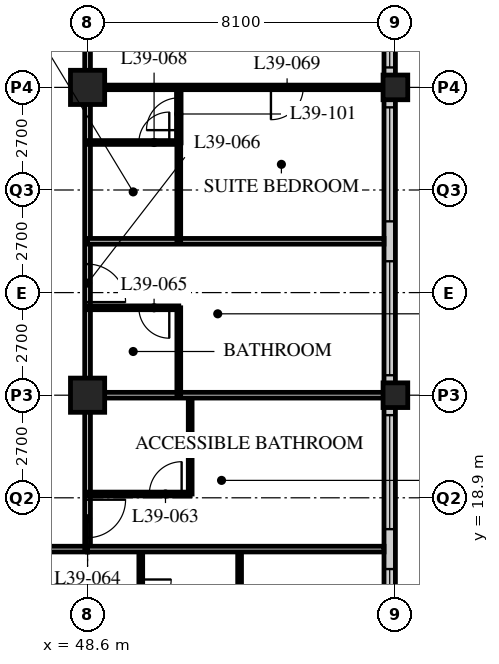
"""IFC4 building model, lengths in metres.
Left out: names, types, materials, properties, quantities, classifications, styles, units other than length and angle.
Written with IfcOpenShell. Run it as: python <this file> out.ifc"""

import sys

from ifc_helpers import new_model, si_unit, direction, frame, frame_2d, origin, origin_2d, place, context, subcontext, project, spatial, rectangle, hollow_rectangle, extrude, element, fill, save


model = new_model("IFC4")
c1 = context("Model", 3, precision=1e-05, world=origin(), true_north=direction((0.0, 1.0)))
c2 = subcontext(c1, "Body", "Model", "MODEL_VIEW")
j1 = project(units=[si_unit("LENGTHUNIT", "METRE"), si_unit("PLANEANGLEUNIT", "RADIAN")], contexts=[c1])
p1 = place(None, origin())
s1 = spatial("IfcSite", under=j1, at=p1, CompositionType="ELEMENT")
p2 = place(p1, origin())
s2 = spatial("IfcBuilding", under=s1, at=p2, CompositionType="ELEMENT")
p3 = place(p2, frame((0.0, 0.0, 151.0)))
s3 = spatial("IfcBuildingStorey", under=s2, at=p3, CompositionType="ELEMENT", Elevation=151.0)
for number, where, z_axis, x_axis in (
    (1, (48.6, 21.6, 0.0), (0.0, 0.0, 1.0), (1.0, 0.0, 0.0)),
    (2, (48.6, 29.7, 0.0), (0.0, 0.0, 1.0), (1.0, 0.0, 0.0)),
):
    element("IfcColumn", number, at=place(p3, frame(where, z_axis=z_axis, x_axis=x_axis)), inside=s3, PredefinedType="COLUMN", context=c2, shape_type="SweptSolid", body=[
        extrude(hollow_rectangle(XDim=0.9, YDim=0.9, WallThickness=0.1, at=origin_2d()), origin(), (0.0, 0.0, 1.0), 3.4),
    ])
for number, where, z_axis, x_axis in (
    (3, (56.7, 21.6, 0.0), (0.0, 0.0, 1.0), (1.0, 0.0, 0.0)),
    (4, (56.7, 29.7, 0.0), (0.0, 0.0, 1.0), (1.0, 0.0, 0.0)),
):
    element("IfcColumn", number, at=place(p3, frame(where, z_axis=z_axis, x_axis=x_axis)), inside=s3, PredefinedType="COLUMN", context=c2, shape_type="SweptSolid", body=[
        extrude(hollow_rectangle(XDim=0.65, YDim=0.65, WallThickness=0.055, at=origin_2d()), origin(), (0.0, 0.0, 1.0), 3.4),
    ])
p4 = place(p3, frame((56.55, 13.8, 0.0), z_axis=(0.0, 0.0, 1.0), x_axis=(0.0, 1.0, 0.0)))
e5 = element("IfcWall", 5, at=p4, inside=s3, PredefinedType="SOLIDWALL", context=c2, shape_type="SweptSolid", body=[
    extrude(rectangle(XDim=32.1, YDim=0.3, at=frame_2d((16.05, 0.0))), origin(), (0.0, 0.0, 1.0), 3.19),
])
p5 = place(p4, frame((0.225, 0.0, 0.9)))
e6 = element("IfcOpeningElement", 6, at=p5, cuts=e5, PredefinedType="OPENING", context=c2, shape_type="SweptSolid", body=[
    extrude(rectangle(XDim=3.0, YDim=1.4, at=frame_2d((1.5, 0.7))), frame((0.0, 0.16, 0.0), z_axis=(0.0, -1.0, 0.0), x_axis=(1.0, 0.0, 0.0)), (0.0, 0.0, 1.0), 0.32),
])
p6 = place(p4, frame((4.275, 0.0, 0.9)))
e7 = element("IfcOpeningElement", 7, at=p6, cuts=e5, PredefinedType="OPENING", context=c2, shape_type="SweptSolid", body=[
    extrude(rectangle(XDim=3.0, YDim=1.4, at=frame_2d((1.5, 0.7))), frame((0.0, 0.16, 0.0), z_axis=(0.0, -1.0, 0.0), x_axis=(1.0, 0.0, 0.0)), (0.0, 0.0, 1.0), 0.32),
])
p7 = place(p4, frame((8.325, 0.0, 0.9)))
e8 = element("IfcOpeningElement", 8, at=p7, cuts=e5, PredefinedType="OPENING", context=c2, shape_type="SweptSolid", body=[
    extrude(rectangle(XDim=3.0, YDim=1.4, at=frame_2d((1.5, 0.7))), frame((0.0, 0.16, 0.0), z_axis=(0.0, -1.0, 0.0), x_axis=(1.0, 0.0, 0.0)), (0.0, 0.0, 1.0), 0.32),
])
p8 = place(p4, frame((12.375, 0.0, 0.9)))
e9 = element("IfcOpeningElement", 9, at=p8, cuts=e5, PredefinedType="OPENING", context=c2, shape_type="SweptSolid", body=[
    extrude(rectangle(XDim=3.0, YDim=1.4, at=frame_2d((1.5, 0.7))), frame((0.0, 0.16, 0.0), z_axis=(0.0, -1.0, 0.0), x_axis=(1.0, 0.0, 0.0)), (0.0, 0.0, 1.0), 0.32),
])
p9 = place(p4, frame((16.425, 0.0, 0.9)))
e10 = element("IfcOpeningElement", 10, at=p9, cuts=e5, PredefinedType="OPENING", context=c2, shape_type="SweptSolid", body=[
    extrude(rectangle(XDim=3.0, YDim=1.4, at=frame_2d((1.5, 0.7))), frame((0.0, 0.16, 0.0), z_axis=(0.0, -1.0, 0.0), x_axis=(1.0, 0.0, 0.0)), (0.0, 0.0, 1.0), 0.32),
])
p10 = place(p4, frame((20.475, 0.0, 0.9)))
e11 = element("IfcOpeningElement", 11, at=p10, cuts=e5, PredefinedType="OPENING", context=c2, shape_type="SweptSolid", body=[
    extrude(rectangle(XDim=3.0, YDim=1.4, at=frame_2d((1.5, 0.7))), frame((0.0, 0.16, 0.0), z_axis=(0.0, -1.0, 0.0), x_axis=(1.0, 0.0, 0.0)), (0.0, 0.0, 1.0), 0.32),
])
p11 = place(p4, frame((24.525, 0.0, 0.9)))
e12 = element("IfcOpeningElement", 12, at=p11, cuts=e5, PredefinedType="OPENING", context=c2, shape_type="SweptSolid", body=[
    extrude(rectangle(XDim=3.0, YDim=1.4, at=frame_2d((1.5, 0.7))), frame((0.0, 0.16, 0.0), z_axis=(0.0, -1.0, 0.0), x_axis=(1.0, 0.0, 0.0)), (0.0, 0.0, 1.0), 0.32),
])
p12 = place(p4, frame((28.575, 0.0, 0.9)))
e13 = element("IfcOpeningElement", 13, at=p12, cuts=e5, PredefinedType="OPENING", context=c2, shape_type="SweptSolid", body=[
    extrude(rectangle(XDim=3.0, YDim=1.4, at=frame_2d((1.5, 0.7))), frame((0.0, 0.16, 0.0), z_axis=(0.0, -1.0, 0.0), x_axis=(1.0, 0.0, 0.0)), (0.0, 0.0, 1.0), 0.32),
])
p13 = place(p3, frame((8.1, 17.55, 0.0), z_axis=(0.0, 0.0, 1.0), x_axis=(1.0, 0.0, 0.0)))
e14 = element("IfcWall", 14, at=p13, inside=s3, PredefinedType="PARTITIONING", context=c2, shape_type="SweptSolid", body=[
    extrude(rectangle(XDim=40.5, YDim=0.15, at=frame_2d((20.25, 0.0))), origin(), (0.0, 0.0, 1.0), 3.19),
])
p14 = place(p13, frame((10.0, 0.0, 0.0)))
e15 = element("IfcOpeningElement", 15, at=p14, cuts=e14, PredefinedType="OPENING", context=c2, shape_type="SweptSolid", body=[
    extrude(rectangle(XDim=1.0, YDim=2.1, at=frame_2d((0.5, 1.05))), frame((0.0, 0.085, 0.0), z_axis=(0.0, -1.0, 0.0), x_axis=(1.0, 0.0, 0.0)), (0.0, 0.0, 1.0), 0.17),
])
p15 = place(p13, frame((22.15, 0.0, 0.0)))
e16 = element("IfcOpeningElement", 16, at=p15, cuts=e14, PredefinedType="OPENING", context=c2, shape_type="SweptSolid", body=[
    extrude(rectangle(XDim=1.0, YDim=2.1, at=frame_2d((0.5, 1.05))), frame((0.0, 0.085, 0.0), z_axis=(0.0, -1.0, 0.0), x_axis=(1.0, 0.0, 0.0)), (0.0, 0.0, 1.0), 0.17),
])
p16 = place(p13, frame((30.8, 0.0, 0.0)))
e17 = element("IfcOpeningElement", 17, at=p16, cuts=e14, PredefinedType="OPENING", context=c2, shape_type="SweptSolid", body=[
    extrude(rectangle(XDim=1.0, YDim=2.1, at=frame_2d((0.5, 1.05))), frame((0.0, 0.085, 0.0), z_axis=(0.0, -1.0, 0.0), x_axis=(1.0, 0.0, 0.0)), (0.0, 0.0, 1.0), 0.17),
])
p17 = place(p13, frame((34.85, 0.0, 0.0)))
e18 = element("IfcOpeningElement", 18, at=p17, cuts=e14, PredefinedType="OPENING", context=c2, shape_type="SweptSolid", body=[
    extrude(rectangle(XDim=1.0, YDim=2.1, at=frame_2d((0.5, 1.05))), frame((0.0, 0.085, 0.0), z_axis=(0.0, -1.0, 0.0), x_axis=(1.0, 0.0, 0.0)), (0.0, 0.0, 1.0), 0.17),
])
p18 = place(p13, frame((1.525, 0.0, 0.0)))
e19 = element("IfcOpeningElement", 19, at=p18, cuts=e14, PredefinedType="OPENING", context=c2, shape_type="SweptSolid", body=[
    extrude(rectangle(XDim=1.0, YDim=2.1, at=frame_2d((0.5, 1.05))), frame((0.0, 0.085, 0.0), z_axis=(0.0, -1.0, 0.0), x_axis=(1.0, 0.0, 0.0)), (0.0, 0.0, 1.0), 0.17),
])
p19 = place(p13, frame((37.975, 0.0, 0.0)))
e20 = element("IfcOpeningElement", 20, at=p19, cuts=e14, PredefinedType="OPENING", context=c2, shape_type="SweptSolid", body=[
    extrude(rectangle(XDim=1.0, YDim=2.1, at=frame_2d((0.5, 1.05))), frame((0.0, 0.085, 0.0), z_axis=(0.0, -1.0, 0.0), x_axis=(1.0, 0.0, 0.0)), (0.0, 0.0, 1.0), 0.17),
])
p20 = place(p3, frame((48.6, 17.55, 0.0), z_axis=(0.0, 0.0, 1.0), x_axis=(0.0, 1.0, 0.0)))
e21 = element("IfcWall", 21, at=p20, inside=s3, PredefinedType="PARTITIONING", context=c2, shape_type="SweptSolid", body=[
    extrude(rectangle(XDim=28.35, YDim=0.15, at=frame_2d((14.175, 0.0))), origin(), (0.0, 0.0, 1.0), 2.42),
])
p21 = place(p20, frame((0.3, 0.0, 0.0)))
e22 = element("IfcOpeningElement", 22, at=p21, cuts=e21, PredefinedType="OPENING", context=c2, shape_type="SweptSolid", body=[
    extrude(rectangle(XDim=1.0, YDim=2.1, at=frame_2d((0.5, 1.05))), frame((0.0, 0.085, 0.0), z_axis=(0.0, -1.0, 0.0), x_axis=(1.0, 0.0, 0.0)), (0.0, 0.0, 1.0), 0.17),
])
p22 = place(p20, frame((6.5, 0.0, 0.0)))
e23 = element("IfcOpeningElement", 23, at=p22, cuts=e21, PredefinedType="OPENING", context=c2, shape_type="SweptSolid", body=[
    extrude(rectangle(XDim=1.0, YDim=2.1, at=frame_2d((0.5, 1.05))), frame((0.0, 0.085, 0.0), z_axis=(0.0, -1.0, 0.0), x_axis=(1.0, 0.0, 0.0)), (0.0, 0.0, 1.0), 0.17),
])
p23 = place(p20, frame((13.675, 0.0, 0.0)))
e24 = element("IfcOpeningElement", 24, at=p23, cuts=e21, PredefinedType="OPENING", context=c2, shape_type="SweptSolid", body=[
    extrude(rectangle(XDim=1.0, YDim=2.1, at=frame_2d((0.5, 1.05))), frame((0.0, 0.085, 0.0), z_axis=(0.0, -1.0, 0.0), x_axis=(1.0, 0.0, 0.0)), (0.0, 0.0, 1.0), 0.17),
])
p24 = place(p20, frame((22.7, 0.0, 0.0)))
e25 = element("IfcOpeningElement", 25, at=p24, cuts=e21, PredefinedType="OPENING", context=c2, shape_type="SweptSolid", body=[
    extrude(rectangle(XDim=1.0, YDim=2.1, at=frame_2d((0.5, 1.05))), frame((0.0, 0.085, 0.0), z_axis=(0.0, -1.0, 0.0), x_axis=(1.0, 0.0, 0.0)), (0.0, 0.0, 1.0), 0.17),
])
p25 = place(p20, frame((24.9, 0.0, 0.0)))
e26 = element("IfcOpeningElement", 26, at=p25, cuts=e21, PredefinedType="OPENING", context=c2, shape_type="SweptSolid", body=[
    extrude(rectangle(XDim=1.0, YDim=2.1, at=frame_2d((0.5, 1.05))), frame((0.0, 0.085, 0.0), z_axis=(0.0, -1.0, 0.0), x_axis=(1.0, 0.0, 0.0)), (0.0, 0.0, 1.0), 0.17),
])
p26 = place(p3, frame((51.3, 19.0, 0.0), z_axis=(0.0, 0.0, 1.0), x_axis=(0.0, 1.0, 0.0)))
e27 = element("IfcWall", 27, at=p26, inside=s3, PredefinedType="PARTITIONING", context=c2, shape_type="SweptSolid", body=[
    extrude(rectangle(XDim=2.6, YDim=0.1, at=frame_2d((1.3, 0.0))), origin(), (0.0, 0.0, 1.0), 3.19),
])
p27 = place(p3, frame((48.6, 19.0, 0.0), z_axis=(0.0, 0.0, 1.0), x_axis=(1.0, 0.0, 0.0)))
e28 = element("IfcWall", 28, at=p27, inside=s3, PredefinedType="PARTITIONING", context=c2, shape_type="SweptSolid", body=[
    extrude(rectangle(XDim=2.7, YDim=0.1, at=frame_2d((1.35, 0.0))), origin(), (0.0, 0.0, 1.0), 3.19),
])
p28 = place(p27, frame((1.625, 0.0, 0.0)))
e29 = element("IfcOpeningElement", 29, at=p28, cuts=e28, PredefinedType="OPENING", context=c2, shape_type="SweptSolid", body=[
    extrude(rectangle(XDim=0.85, YDim=2.1, at=frame_2d((0.425, 1.05))), frame((0.0, 0.06, 0.0), z_axis=(0.0, -1.0, 0.0), x_axis=(1.0, 0.0, 0.0)), (0.0, 0.0, 1.0), 0.12),
])
p29 = place(p3, frame((48.6, 21.6, 0.0), z_axis=(0.0, 0.0, 1.0), x_axis=(1.0, 0.0, 0.0)))
e30 = element("IfcWall", 30, at=p29, inside=s3, PredefinedType="PARTITIONING", context=c2, shape_type="SweptSolid", body=[
    extrude(rectangle(XDim=7.8, YDim=0.15, at=frame_2d((3.9, 0.0))), origin(), (0.0, 0.0, 1.0), 2.42),
])
p30 = place(p3, frame((51.0, 21.6, 0.0), z_axis=(0.0, 0.0, 1.0), x_axis=(0.0, 1.0, 0.0)))
e31 = element("IfcWall", 31, at=p30, inside=s3, PredefinedType="PARTITIONING", context=c2, shape_type="SweptSolid", body=[
    extrude(rectangle(XDim=2.3, YDim=0.1, at=frame_2d((1.15, 0.0))), origin(), (0.0, 0.0, 1.0), 3.19),
])
p31 = place(p3, frame((48.6, 23.9, 0.0), z_axis=(0.0, 0.0, 1.0), x_axis=(1.0, 0.0, 0.0)))
e32 = element("IfcWall", 32, at=p31, inside=s3, PredefinedType="PARTITIONING", context=c2, shape_type="SweptSolid", body=[
    extrude(rectangle(XDim=2.4, YDim=0.1, at=frame_2d((1.2, 0.0))), origin(), (0.0, 0.0, 1.0), 3.19),
])
p32 = place(p31, frame((1.35, 0.0, 0.0)))
e33 = element("IfcOpeningElement", 33, at=p32, cuts=e32, PredefinedType="OPENING", context=c2, shape_type="SweptSolid", body=[
    extrude(rectangle(XDim=0.8, YDim=2.1, at=frame_2d((0.4, 1.05))), frame((0.0, 0.06, 0.0), z_axis=(0.0, -1.0, 0.0), x_axis=(1.0, 0.0, 0.0)), (0.0, 0.0, 1.0), 0.12),
])
p33 = place(p3, frame((48.6, 25.65, 0.0), z_axis=(0.0, 0.0, 1.0), x_axis=(1.0, 0.0, 0.0)))
e34 = element("IfcWall", 34, at=p33, inside=s3, PredefinedType="PARTITIONING", context=c2, shape_type="SweptSolid", body=[
    extrude(rectangle(XDim=7.8, YDim=0.15, at=frame_2d((3.9, 0.0))), origin(), (0.0, 0.0, 1.0), 3.19),
])
p34 = place(p3, frame((51.0, 25.65, 0.0), z_axis=(0.0, 0.0, 1.0), x_axis=(0.0, 1.0, 0.0)))
e35 = element("IfcWall", 35, at=p34, inside=s3, PredefinedType="PARTITIONING", context=c2, shape_type="SweptSolid", body=[
    extrude(rectangle(XDim=2.6, YDim=0.1, at=frame_2d((1.3, 0.0))), origin(), (0.0, 0.0, 1.0), 3.19),
])
p35 = place(p3, frame((48.6, 28.25, 0.0), z_axis=(0.0, 0.0, 1.0), x_axis=(1.0, 0.0, 0.0)))
e36 = element("IfcWall", 36, at=p35, inside=s3, PredefinedType="PARTITIONING", context=c2, shape_type="SweptSolid", body=[
    extrude(rectangle(XDim=2.4, YDim=0.1, at=frame_2d((1.2, 0.0))), origin(), (0.0, 0.0, 1.0), 3.19),
])
p36 = place(p35, frame((1.35, 0.0, 0.0)))
e37 = element("IfcOpeningElement", 37, at=p36, cuts=e36, PredefinedType="OPENING", context=c2, shape_type="SweptSolid", body=[
    extrude(rectangle(XDim=0.8, YDim=2.1, at=frame_2d((0.4, 1.05))), frame((0.0, 0.06, 0.0), z_axis=(0.0, -1.0, 0.0), x_axis=(1.0, 0.0, 0.0)), (0.0, 0.0, 1.0), 0.12),
])
p37 = place(p3, frame((48.6, 29.7, 0.0), z_axis=(0.0, 0.0, 1.0), x_axis=(1.0, 0.0, 0.0)))
e38 = element("IfcWall", 38, at=p37, inside=s3, PredefinedType="PARTITIONING", context=c2, shape_type="SweptSolid", body=[
    extrude(rectangle(XDim=7.8, YDim=0.12, at=frame_2d((3.9, 0.0))), origin(), (0.0, 0.0, 1.0), 2.42),
])
p38 = place(p37, frame((4.825, 0.0, 0.0)))
e39 = element("IfcOpeningElement", 39, at=p38, cuts=e38, PredefinedType="OPENING", context=c2, shape_type="SweptSolid", body=[
    extrude(rectangle(XDim=0.85, YDim=2.1, at=frame_2d((0.425, 1.05))), frame((0.0, 0.07, 0.0), z_axis=(0.0, -1.0, 0.0), x_axis=(1.0, 0.0, 0.0)), (0.0, 0.0, 1.0), 0.14),
])
p39 = place(p3, frame((50.0, 17.55, 0.0), z_axis=(0.0, 0.0, 1.0), x_axis=(0.0, -1.0, 0.0)))
e40 = element("IfcWall", 40, at=p39, inside=s3, PredefinedType="PARTITIONING", context=c2, shape_type="SweptSolid", body=[
    extrude(rectangle(XDim=2.4, YDim=0.1, at=frame_2d((1.2, 0.0))), origin(), (0.0, 0.0, 1.0), 3.19),
])
p40 = place(p39, frame((0.8, 0.0, 0.0)))
e41 = element("IfcOpeningElement", 41, at=p40, cuts=e40, PredefinedType="OPENING", context=c2, shape_type="SweptSolid", body=[
    extrude(rectangle(XDim=0.8, YDim=2.1, at=frame_2d((0.4, 1.05))), frame((0.0, 0.06, 0.0), z_axis=(0.0, -1.0, 0.0), x_axis=(1.0, 0.0, 0.0)), (0.0, 0.0, 1.0), 0.12),
])
p41 = place(p3, frame((52.6, 17.55, 0.0), z_axis=(0.0, 0.0, 1.0), x_axis=(0.0, -1.0, 0.0)))
e42 = element("IfcWall", 42, at=p41, inside=s3, PredefinedType="PARTITIONING", context=c2, shape_type="SweptSolid", body=[
    extrude(rectangle(XDim=2.4, YDim=0.1, at=frame_2d((1.2, 0.0))), origin(), (0.0, 0.0, 1.0), 3.19),
])
p42 = place(p3, frame((48.6, 17.55, 0.0), z_axis=(0.0, 0.0, 1.0), x_axis=(1.0, 0.0, 0.0)))
e43 = element("IfcWall", 43, at=p42, inside=s3, PredefinedType="PARTITIONING", context=c2, shape_type="SweptSolid", body=[
    extrude(rectangle(XDim=7.8, YDim=0.15, at=frame_2d((3.9, 0.0))), origin(), (0.0, 0.0, 1.0), 3.19),
])
p43 = place(p3, frame((51.0, 29.7, 0.0), z_axis=(0.0, 0.0, 1.0), x_axis=(0.0, -1.0, 0.0)))
e44 = element("IfcWall", 44, at=p43, inside=s3, PredefinedType="PARTITIONING", context=c2, shape_type="SweptSolid", body=[
    extrude(rectangle(XDim=1.46, YDim=0.12, at=frame_2d((0.73, 0.0))), origin(), (0.0, 0.0, 1.0), 3.19),
])
p44 = place(p43, frame((0.275, 0.0, 0.0)))
e45 = element("IfcOpeningElement", 45, at=p44, cuts=e44, PredefinedType="OPENING", context=c2, shape_type="SweptSolid", body=[
    extrude(rectangle(XDim=0.85, YDim=2.1, at=frame_2d((0.425, 1.05))), frame((0.0, 0.07, 0.0), z_axis=(0.0, -1.0, 0.0), x_axis=(1.0, 0.0, 0.0)), (0.0, 0.0, 1.0), 0.14),
])
p45 = place(p5, origin())
e46 = element("IfcWindow", 46, at=p45, inside=s3, PartitioningType="SINGLE_PANEL", PredefinedType="WINDOW", context=c2, shape_type="SweptSolid", body=[
    extrude(rectangle(XDim=3.0, YDim=1.4, at=frame_2d((1.5, 0.7))), frame((0.0, 0.03, 0.0), z_axis=(0.0, -1.0, 0.0), x_axis=(1.0, 0.0, 0.0)), (0.0, 0.0, 1.0), 0.06),
])
fill(e6, e46)
p46 = place(p6, origin())
e47 = element("IfcWindow", 47, at=p46, inside=s3, PartitioningType="SINGLE_PANEL", PredefinedType="WINDOW", context=c2, shape_type="SweptSolid", body=[
    extrude(rectangle(XDim=3.0, YDim=1.4, at=frame_2d((1.5, 0.7))), frame((0.0, 0.03, 0.0), z_axis=(0.0, -1.0, 0.0), x_axis=(1.0, 0.0, 0.0)), (0.0, 0.0, 1.0), 0.06),
])
fill(e7, e47)
p47 = place(p7, origin())
e48 = element("IfcWindow", 48, at=p47, inside=s3, PartitioningType="SINGLE_PANEL", PredefinedType="WINDOW", context=c2, shape_type="SweptSolid", body=[
    extrude(rectangle(XDim=3.0, YDim=1.4, at=frame_2d((1.5, 0.7))), frame((0.0, 0.03, 0.0), z_axis=(0.0, -1.0, 0.0), x_axis=(1.0, 0.0, 0.0)), (0.0, 0.0, 1.0), 0.06),
])
fill(e8, e48)
p48 = place(p8, origin())
e49 = element("IfcWindow", 49, at=p48, inside=s3, PartitioningType="SINGLE_PANEL", PredefinedType="WINDOW", context=c2, shape_type="SweptSolid", body=[
    extrude(rectangle(XDim=3.0, YDim=1.4, at=frame_2d((1.5, 0.7))), frame((0.0, 0.03, 0.0), z_axis=(0.0, -1.0, 0.0), x_axis=(1.0, 0.0, 0.0)), (0.0, 0.0, 1.0), 0.06),
])
fill(e9, e49)
p49 = place(p9, origin())
e50 = element("IfcWindow", 50, at=p49, inside=s3, PartitioningType="SINGLE_PANEL", PredefinedType="WINDOW", context=c2, shape_type="SweptSolid", body=[
    extrude(rectangle(XDim=3.0, YDim=1.4, at=frame_2d((1.5, 0.7))), frame((0.0, 0.03, 0.0), z_axis=(0.0, -1.0, 0.0), x_axis=(1.0, 0.0, 0.0)), (0.0, 0.0, 1.0), 0.06),
])
fill(e10, e50)
p50 = place(p28, origin())
e51 = element("IfcDoor", 51, at=p50, inside=s3, OperationType="SINGLE_SWING_RIGHT", PredefinedType="DOOR", context=c2, shape_type="SweptSolid", body=[
    extrude(rectangle(XDim=0.85, YDim=2.1, at=frame_2d((0.425, 1.05))), frame((0.0, 0.025, 0.0), z_axis=(0.0, -1.0, 0.0), x_axis=(1.0, 0.0, 0.0)), (0.0, 0.0, 1.0), 0.05),
])
fill(e29, e51)
p51 = place(p21, origin())
e52 = element("IfcDoor", 52, at=p51, inside=s3, OperationType="SINGLE_SWING_LEFT", PredefinedType="DOOR", context=c2, shape_type="SweptSolid", body=[
    extrude(rectangle(XDim=1.0, YDim=2.1, at=frame_2d((0.5, 1.05))), frame((0.0, 0.025, 0.0), z_axis=(0.0, -1.0, 0.0), x_axis=(1.0, 0.0, 0.0)), (0.0, 0.0, 1.0), 0.05),
])
fill(e22, e52)
p52 = place(p32, origin())
e53 = element("IfcDoor", 53, at=p52, inside=s3, OperationType="SINGLE_SWING_LEFT", PredefinedType="DOOR", context=c2, shape_type="SweptSolid", body=[
    extrude(rectangle(XDim=0.8, YDim=2.1, at=frame_2d((0.4, 1.05))), frame((0.0, 0.025, 0.0), z_axis=(0.0, -1.0, 0.0), x_axis=(1.0, 0.0, 0.0)), (0.0, 0.0, 1.0), 0.05),
])
fill(e33, e53)
p53 = place(p22, origin())
e54 = element("IfcDoor", 54, at=p53, inside=s3, OperationType="SINGLE_SWING_RIGHT", PredefinedType="DOOR", context=c2, shape_type="SweptSolid", body=[
    extrude(rectangle(XDim=1.0, YDim=2.1, at=frame_2d((0.5, 1.05))), frame((0.0, 0.025, 0.0), z_axis=(0.0, -1.0, 0.0), x_axis=(1.0, 0.0, 0.0)), (0.0, 0.0, 1.0), 0.05),
])
fill(e23, e54)
p54 = place(p36, origin())
e55 = element("IfcDoor", 55, at=p54, inside=s3, OperationType="SINGLE_SWING_RIGHT", PredefinedType="DOOR", context=c2, shape_type="SweptSolid", body=[
    extrude(rectangle(XDim=0.8, YDim=2.1, at=frame_2d((0.4, 1.05))), frame((0.0, 0.025, 0.0), z_axis=(0.0, -1.0, 0.0), x_axis=(1.0, 0.0, 0.0)), (0.0, 0.0, 1.0), 0.05),
])
fill(e37, e55)
p55 = place(p38, origin())
e56 = element("IfcDoor", 56, at=p55, inside=s3, OperationType="SINGLE_SWING_RIGHT", PredefinedType="DOOR", context=c2, shape_type="SweptSolid", body=[
    extrude(rectangle(XDim=0.85, YDim=2.1, at=frame_2d((0.425, 1.05))), frame((0.0, 0.025, 0.0), z_axis=(0.0, -1.0, 0.0), x_axis=(1.0, 0.0, 0.0)), (0.0, 0.0, 1.0), 0.05),
])
fill(e39, e56)
p56 = place(p40, origin())
e57 = element("IfcDoor", 57, at=p56, inside=s3, OperationType="SINGLE_SWING_LEFT", PredefinedType="DOOR", context=c2, shape_type="SweptSolid", body=[
    extrude(rectangle(XDim=0.8, YDim=2.1, at=frame_2d((0.4, 1.05))), frame((0.0, 0.025, 0.0), z_axis=(0.0, -1.0, 0.0), x_axis=(1.0, 0.0, 0.0)), (0.0, 0.0, 1.0), 0.05),
])
fill(e41, e57)
p57 = place(p44, origin())
e58 = element("IfcDoor", 58, at=p57, inside=s3, OperationType="SINGLE_SWING_LEFT", PredefinedType="DOOR", context=c2, shape_type="SweptSolid", body=[
    extrude(rectangle(XDim=0.85, YDim=2.1, at=frame_2d((0.425, 1.05))), frame((0.0, 0.025, 0.0), z_axis=(0.0, -1.0, 0.0), x_axis=(1.0, 0.0, 0.0)), (0.0, 0.0, 1.0), 0.05),
])
fill(e45, e58)
save(model, sys.argv[1])
